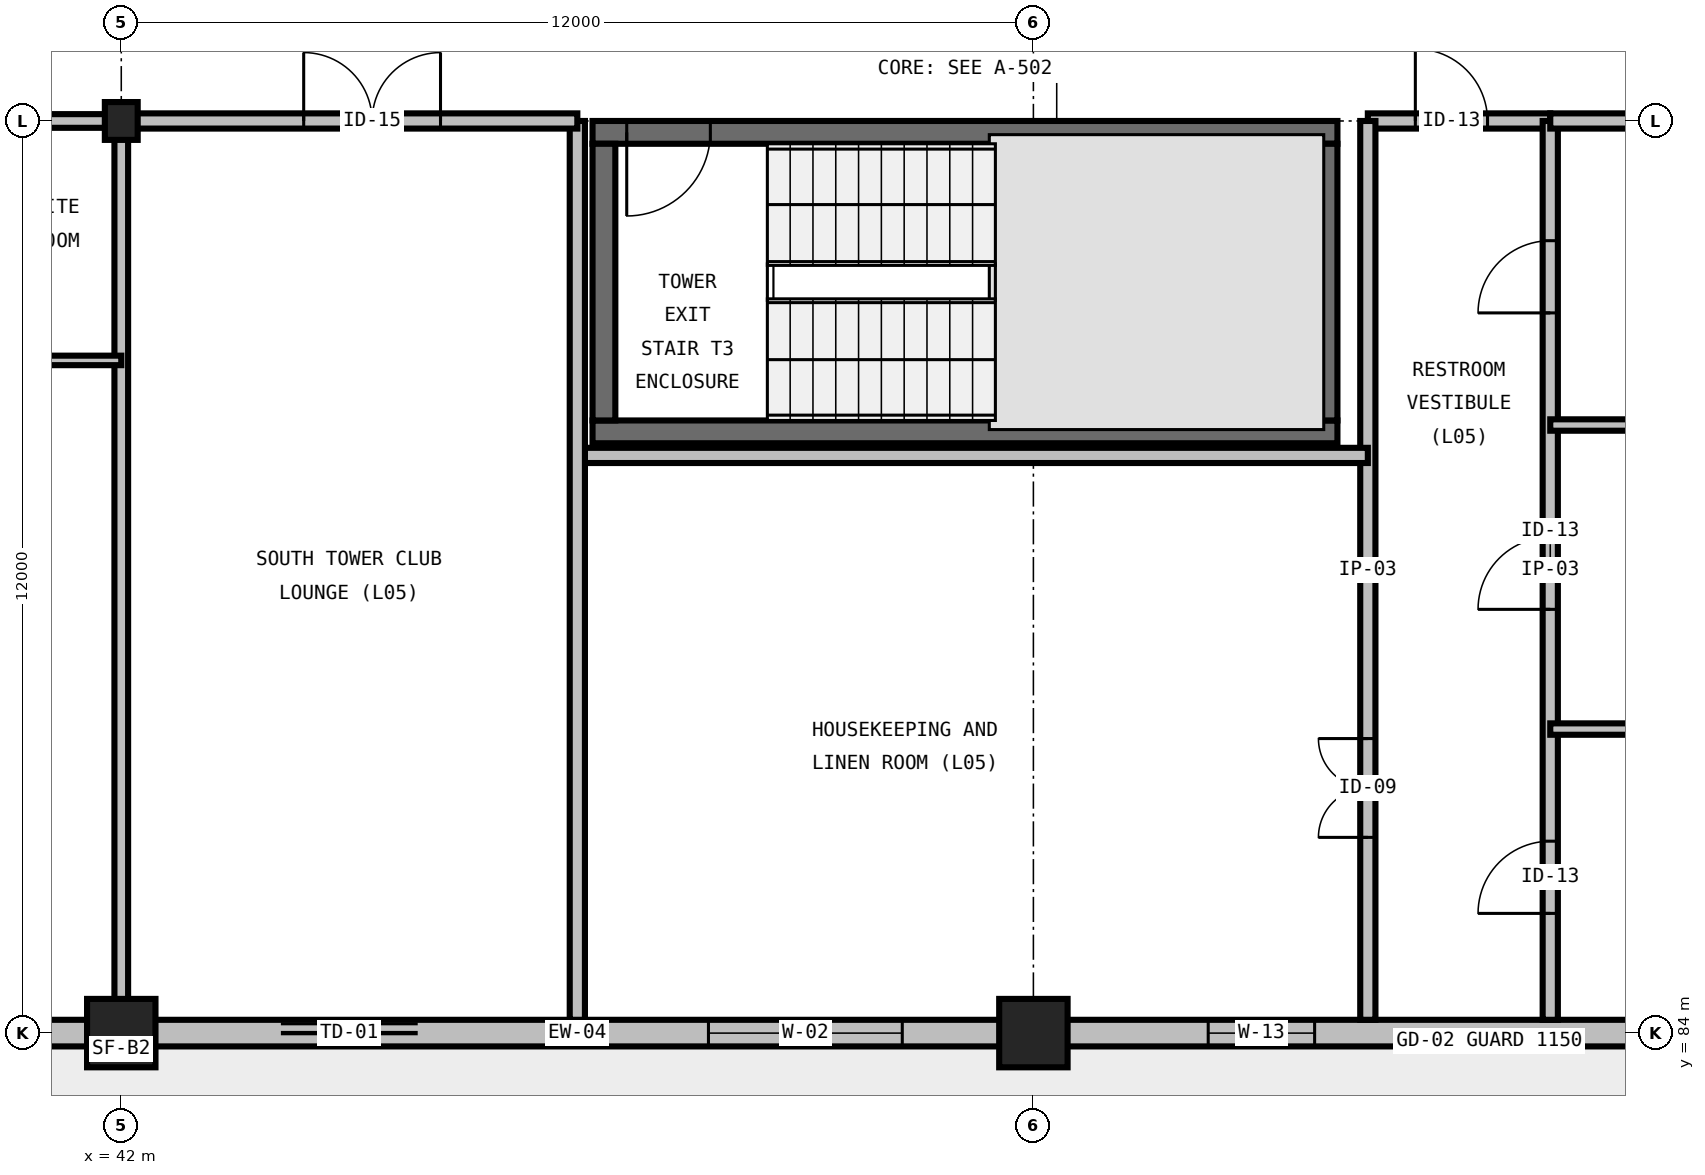
"""IFC4 building model, lengths in metres.
Left out: names, types, materials, properties, quantities, classifications, styles, units other than length and angle.
Written with IfcOpenShell. Run it as: python <this file> out.ifc"""

import sys

from ifc_helpers import new_model, si_unit, direction, frame, frame_2d, origin, origin_2d, place, context, subcontext, project, spatial, rectangle, i_section, extrude, element, fill, save


model = new_model("IFC4")
c1 = context("Model", 3, precision=1e-05, world=origin(), true_north=direction((0.0, 1.0)))
c2 = subcontext(c1, "Body", "Model", "MODEL_VIEW")
j1 = project(units=[si_unit("LENGTHUNIT", "METRE"), si_unit("PLANEANGLEUNIT", "RADIAN")], contexts=[c1])
p1 = place(None, origin())
s1 = spatial("IfcSite", under=j1, at=p1, CompositionType="ELEMENT")
p2 = place(p1, origin())
s2 = spatial("IfcBuilding", under=s1, at=p2, CompositionType="ELEMENT")
p3 = place(p2, frame((0.0, 0.0, 27.6)))
s3 = spatial("IfcBuildingStorey", under=s2, at=p3, CompositionType="ELEMENT", Elevation=27.6)
p4 = place(p3, frame((42.0, 84.0, 0.0), z_axis=(0.0, 0.0, 1.0), x_axis=(1.0, 0.0, 0.0)))
e1 = element("IfcColumn", 1, at=p4, inside=s3, PredefinedType="COLUMN", context=c2, shape_type="SweptSolid", body=[
    extrude(rectangle(XDim=0.9, YDim=0.9, at=origin_2d()), origin(), (0.0, 0.0, 1.0), 3.6),
])
p5 = place(p3, frame((42.0, 96.0, 0.0), z_axis=(0.0, 0.0, 1.0), x_axis=(1.0, 0.0, 0.0)))
e2 = element("IfcColumn", 2, at=p5, inside=s3, PredefinedType="COLUMN", context=c2, shape_type="SweptSolid", body=[
    extrude(i_section(OverallWidth=0.432, OverallDepth=0.498, WebThickness=0.056, FlangeThickness=0.089, FilletRadius=0.031, at=origin_2d()), origin(), (0.0, 0.0, 1.0), 3.6),
])
p6 = place(p3, frame((54.0, 84.0, 0.0), z_axis=(0.0, 0.0, 1.0), x_axis=(1.0, 0.0, 0.0)))
e3 = element("IfcColumn", 3, at=p6, inside=s3, PredefinedType="COLUMN", context=c2, shape_type="SweptSolid", body=[
    extrude(rectangle(XDim=0.9, YDim=0.9, at=origin_2d()), origin(), (0.0, 0.0, 1.0), 3.6),
])
p7 = place(p3, frame((48.2, 91.91, 0.0), z_axis=(0.0, 0.0, 1.0), x_axis=(1.0, 0.0, 0.0)))
e4 = element("IfcWall", 4, at=p7, inside=s3, PredefinedType="SHEAR", context=c2, shape_type="SweptSolid", body=[
    extrude(rectangle(XDim=9.8, YDim=0.3, at=frame_2d((4.9, 0.0))), origin(), (0.0, 0.0, 1.0), 3.6),
])
p8 = place(p3, frame((58.0, 95.85, 0.0), z_axis=(0.0, 0.0, 1.0), x_axis=(-1.0, 0.0, 0.0)))
e5 = element("IfcWall", 5, at=p8, inside=s3, PredefinedType="SHEAR", context=c2, shape_type="SweptSolid", body=[
    extrude(rectangle(XDim=9.8, YDim=0.3, at=frame_2d((4.9, 0.0))), origin(), (0.0, 0.0, 1.0), 3.6),
])
p9 = place(p8, frame((8.25, 0.0, 0.0)))
e6 = element("IfcOpeningElement", 6, at=p9, cuts=e5, PredefinedType="OPENING", context=c2, shape_type="SweptSolid", body=[
    extrude(rectangle(XDim=1.1, YDim=2.2, at=frame_2d((0.55, 1.1))), frame((0.0, 0.165, 0.0), z_axis=(0.0, -1.0, 0.0), x_axis=(1.0, 0.0, 0.0)), (0.0, 0.0, 1.0), 0.33),
])
for number, where, z_axis, x_axis in (
    (7, (48.35, 95.7, 0.0), (0.0, 0.0, 1.0), (0.0, -1.0, 0.0)),
    (8, (57.85, 92.06, 0.0), (0.0, 0.0, 1.0), (0.0, 1.0, 0.0)),
):
    element("IfcWall", number, at=place(p3, frame(where, z_axis=z_axis, x_axis=x_axis)), inside=s3, PredefinedType="SHEAR", context=c2, shape_type="SweptSolid", body=[
        extrude(rectangle(XDim=3.64, YDim=0.3, at=frame_2d((1.82, 0.0))), origin(), (0.0, 0.0, 1.0), 3.6),
    ])
p10 = place(p3, frame((36.0, 84.0, 0.0), z_axis=(0.0, 0.0, 1.0), x_axis=(1.0, 0.0, 0.0)))
e9 = element("IfcWall", 9, at=p10, inside=s3, PredefinedType="STANDARD", context=c2, shape_type="SweptSolid", body=[
    extrude(rectangle(XDim=6.0, YDim=0.35, at=frame_2d((3.0, 0.0))), origin(), (0.0, 0.0, 1.0), 2.486),
])
p11 = place(p10, frame((1.8, 0.0, 0.75)))
e10 = element("IfcOpeningElement", 10, at=p11, cuts=e9, PredefinedType="OPENING", context=c2, shape_type="SweptSolid", body=[
    extrude(rectangle(XDim=2.4, YDim=1.65, at=frame_2d((1.2, 0.825))), frame((0.0, 0.19, 0.0), z_axis=(0.0, -1.0, 0.0), x_axis=(1.0, 0.0, 0.0)), (0.0, 0.0, 1.0), 0.38),
])
p12 = place(p3, frame((42.0, 84.0, 0.0), z_axis=(0.0, 0.0, 1.0), x_axis=(1.0, 0.0, 0.0)))
e11 = element("IfcWall", 11, at=p12, inside=s3, PredefinedType="STANDARD", context=c2, shape_type="SweptSolid", body=[
    extrude(rectangle(XDim=12.0, YDim=0.35, at=frame_2d((6.0, 0.0))), origin(), (0.0, 0.0, 1.0), 2.486),
])
p13 = place(p12, frame((2.1, 0.0, 0.0)))
e12 = element("IfcOpeningElement", 12, at=p13, cuts=e11, PredefinedType="OPENING", context=c2, shape_type="SweptSolid", body=[
    extrude(rectangle(XDim=1.8, YDim=2.2, at=frame_2d((0.9, 1.1))), frame((0.0, 0.19, 0.0), z_axis=(0.0, -1.0, 0.0), x_axis=(1.0, 0.0, 0.0)), (0.0, 0.0, 1.0), 0.38),
])
p14 = place(p12, frame((7.725, 0.0, 0.75)))
e13 = element("IfcOpeningElement", 13, at=p14, cuts=e11, PredefinedType="OPENING", context=c2, shape_type="SweptSolid", body=[
    extrude(rectangle(XDim=2.55, YDim=1.65, at=frame_2d((1.275, 0.825))), frame((0.0, 0.19, 0.0), z_axis=(0.0, -1.0, 0.0), x_axis=(1.0, 0.0, 0.0)), (0.0, 0.0, 1.0), 0.38),
])
p15 = place(p3, frame((54.0, 84.0, 0.0), z_axis=(0.0, 0.0, 1.0), x_axis=(1.0, 0.0, 0.0)))
e14 = element("IfcWall", 14, at=p15, inside=s3, PredefinedType="STANDARD", context=c2, shape_type="SweptSolid", body=[
    extrude(rectangle(XDim=12.0, YDim=0.35, at=frame_2d((6.0, 0.0))), origin(), (0.0, 0.0, 1.0), 2.486),
])
p16 = place(p15, frame((2.3, 0.0, 1.0)))
e15 = element("IfcOpeningElement", 15, at=p16, cuts=e14, PredefinedType="OPENING", context=c2, shape_type="SweptSolid", body=[
    extrude(rectangle(XDim=1.4, YDim=1.4, at=frame_2d((0.7, 0.7))), frame((0.0, 0.19, 0.0), z_axis=(0.0, -1.0, 0.0), x_axis=(1.0, 0.0, 0.0)), (0.0, 0.0, 1.0), 0.38),
])
p17 = place(p15, frame((8.25, 0.0, 1.0)))
e16 = element("IfcOpeningElement", 16, at=p17, cuts=e14, PredefinedType="OPENING", context=c2, shape_type="SweptSolid", body=[
    extrude(rectangle(XDim=1.5, YDim=1.35, at=frame_2d((0.75, 0.675))), frame((0.0, 0.19, 0.0), z_axis=(0.0, -1.0, 0.0), x_axis=(1.0, 0.0, 0.0)), (0.0, 0.0, 1.0), 0.38),
])
p18 = place(p3, frame((58.4, 96.0, 0.0), z_axis=(0.0, 0.0, 1.0), x_axis=(1.0, 0.0, 0.0)))
e17 = element("IfcWall", 17, at=p18, inside=s3, PredefinedType="PARTITIONING", context=c2, shape_type="SweptSolid", body=[
    extrude(rectangle(XDim=2.4, YDim=0.2, at=frame_2d((1.2, 0.0))), origin(), (0.0, 0.0, 1.0), 2.359),
])
p19 = place(p18, frame((0.625, 0.0, 0.0)))
e18 = element("IfcOpeningElement", 18, at=p19, cuts=e17, PredefinedType="OPENING", context=c2, shape_type="SweptSolid", body=[
    extrude(rectangle(XDim=0.95, YDim=2.15, at=frame_2d((0.475, 1.075))), frame((0.0, 0.115, 0.0), z_axis=(0.0, -1.0, 0.0), x_axis=(1.0, 0.0, 0.0)), (0.0, 0.0, 1.0), 0.23),
])
p20 = place(p3, frame((58.4, 84.175, 0.0), z_axis=(0.0, 0.0, 1.0), x_axis=(0.0, 1.0, 0.0)))
e19 = element("IfcWall", 19, at=p20, inside=s3, PredefinedType="PARTITIONING", context=c2, shape_type="SweptSolid", body=[
    extrude(rectangle(XDim=11.825, YDim=0.2, at=frame_2d((5.913, 0.0))), origin(), (0.0, 0.0, 1.0), 3.29),
])
p21 = place(p20, frame((2.4, 0.0, 0.0)))
e20 = element("IfcOpeningElement", 20, at=p21, cuts=e19, PredefinedType="OPENING", context=c2, shape_type="SweptSolid", body=[
    extrude(rectangle(XDim=1.3, YDim=2.2, at=frame_2d((0.65, 1.1))), frame((0.0, 0.115, 0.0), z_axis=(0.0, -1.0, 0.0), x_axis=(1.0, 0.0, 0.0)), (0.0, 0.0, 1.0), 0.23),
])
p22 = place(p3, frame((60.8, 84.175, 0.0), z_axis=(0.0, 0.0, 1.0), x_axis=(0.0, 1.0, 0.0)))
e21 = element("IfcWall", 21, at=p22, inside=s3, PredefinedType="PARTITIONING", context=c2, shape_type="SweptSolid", body=[
    extrude(rectangle(XDim=11.825, YDim=0.2, at=frame_2d((5.913, 0.0))), origin(), (0.0, 0.0, 1.0), 3.29),
])
p23 = place(p22, frame((1.4, 0.0, 0.0)))
e22 = element("IfcOpeningElement", 22, at=p23, cuts=e21, PredefinedType="OPENING", context=c2, shape_type="SweptSolid", body=[
    extrude(rectangle(XDim=0.95, YDim=2.15, at=frame_2d((0.475, 1.075))), frame((0.0, 0.115, 0.0), z_axis=(0.0, -1.0, 0.0), x_axis=(1.0, 0.0, 0.0)), (0.0, 0.0, 1.0), 0.23),
])
p24 = place(p22, frame((5.4, 0.0, 0.0)))
e23 = element("IfcOpeningElement", 23, at=p24, cuts=e21, PredefinedType="OPENING", context=c2, shape_type="SweptSolid", body=[
    extrude(rectangle(XDim=0.95, YDim=2.15, at=frame_2d((0.475, 1.075))), frame((0.0, 0.115, 0.0), z_axis=(0.0, -1.0, 0.0), x_axis=(1.0, 0.0, 0.0)), (0.0, 0.0, 1.0), 0.23),
])
p25 = place(p22, frame((9.3, 0.0, 0.0)))
e24 = element("IfcOpeningElement", 24, at=p25, cuts=e21, PredefinedType="OPENING", context=c2, shape_type="SweptSolid", body=[
    extrude(rectangle(XDim=0.95, YDim=2.15, at=frame_2d((0.475, 1.075))), frame((0.0, 0.115, 0.0), z_axis=(0.0, -1.0, 0.0), x_axis=(1.0, 0.0, 0.0)), (0.0, 0.0, 1.0), 0.23),
])
p26 = place(p3, frame((60.8, 96.0, 0.0), z_axis=(0.0, 0.0, 1.0), x_axis=(1.0, 0.0, 0.0)))
e25 = element("IfcWall", 25, at=p26, inside=s3, PredefinedType="PARTITIONING", context=c2, shape_type="SweptSolid", body=[
    extrude(rectangle(XDim=5.2, YDim=0.2, at=frame_2d((2.6, 0.0))), origin(), (0.0, 0.0, 1.0), 2.359),
])
for number, where, z_axis, x_axis in (
    (26, (60.8, 88.0, 0.0), (0.0, 0.0, 1.0), (1.0, 0.0, 0.0)),
    (27, (60.8, 92.0, 0.0), (0.0, 0.0, 1.0), (1.0, 0.0, 0.0)),
):
    element("IfcWall", number, at=place(p3, frame(where, z_axis=z_axis, x_axis=x_axis)), inside=s3, PredefinedType="PARTITIONING", context=c2, shape_type="SweptSolid", body=[
        extrude(rectangle(XDim=5.2, YDim=0.15, at=frame_2d((2.6, 0.0))), origin(), (0.0, 0.0, 1.0), 3.29),
    ])
p27 = place(p3, frame((48.0, 91.6, 0.0), z_axis=(0.0, 0.0, 1.0), x_axis=(1.0, 0.0, 0.0)))
e28 = element("IfcWall", 28, at=p27, inside=s3, PredefinedType="PARTITIONING", context=c2, shape_type="SweptSolid", body=[
    extrude(rectangle(XDim=10.4, YDim=0.2, at=frame_2d((5.2, 0.0))), origin(), (0.0, 0.0, 1.0), 3.29),
])
p28 = place(p3, frame((48.0, 84.175, 0.0), z_axis=(0.0, 0.0, 1.0), x_axis=(0.0, 1.0, 0.0)))
e29 = element("IfcWall", 29, at=p28, inside=s3, PredefinedType="PARTITIONING", context=c2, shape_type="SweptSolid", body=[
    extrude(rectangle(XDim=11.825, YDim=0.2, at=frame_2d((5.913, 0.0))), origin(), (0.0, 0.0, 1.0), 3.29),
])
p29 = place(p3, frame((42.0, 96.0, 0.0), z_axis=(0.0, 0.0, 1.0), x_axis=(1.0, 0.0, 0.0)))
e30 = element("IfcWall", 30, at=p29, inside=s3, PredefinedType="PARTITIONING", context=c2, shape_type="SweptSolid", body=[
    extrude(rectangle(XDim=6.0, YDim=0.2, at=frame_2d((3.0, 0.0))), origin(), (0.0, 0.0, 1.0), 2.359),
])
p30 = place(p29, frame((2.4, 0.0, 0.0)))
e31 = element("IfcOpeningElement", 31, at=p30, cuts=e30, PredefinedType="OPENING", context=c2, shape_type="SweptSolid", body=[
    extrude(rectangle(XDim=1.8, YDim=2.3, at=frame_2d((0.9, 1.15))), frame((0.0, 0.115, 0.0), z_axis=(0.0, -1.0, 0.0), x_axis=(1.0, 0.0, 0.0)), (0.0, 0.0, 1.0), 0.23),
])
p31 = place(p3, frame((42.0, 84.175, 0.0), z_axis=(0.0, 0.0, 1.0), x_axis=(0.0, 1.0, 0.0)))
e32 = element("IfcWall", 32, at=p31, inside=s3, PredefinedType="PARTITIONING", context=c2, shape_type="SweptSolid", body=[
    extrude(rectangle(XDim=11.825, YDim=0.18, at=frame_2d((5.913, 0.0))), origin(), (0.0, 0.0, 1.0), 2.59),
])
p32 = place(p3, frame((36.0, 96.0, 0.0), z_axis=(0.0, 0.0, 1.0), x_axis=(1.0, 0.0, 0.0)))
e33 = element("IfcWall", 33, at=p32, inside=s3, PredefinedType="PARTITIONING", context=c2, shape_type="SweptSolid", body=[
    extrude(rectangle(XDim=6.0, YDim=0.18, at=frame_2d((3.0, 0.0))), origin(), (0.0, 0.0, 1.0), 2.736),
])
p33 = place(p32, frame((0.77, 0.0, 0.0)))
e34 = element("IfcOpeningElement", 34, at=p33, cuts=e33, PredefinedType="OPENING", context=c2, shape_type="SweptSolid", body=[
    extrude(rectangle(XDim=1.0, YDim=2.15, at=frame_2d((0.5, 1.075))), frame((0.0, 0.105, 0.0), z_axis=(0.0, -1.0, 0.0), x_axis=(1.0, 0.0, 0.0)), (0.0, 0.0, 1.0), 0.21),
])
p34 = place(p3, frame((39.48, 92.85, 0.0), z_axis=(0.0, 0.0, 1.0), x_axis=(1.0, 0.0, 0.0)))
e35 = element("IfcWall", 35, at=p34, inside=s3, PredefinedType="PARTITIONING", context=c2, shape_type="SweptSolid", body=[
    extrude(rectangle(XDim=2.52, YDim=0.125, at=frame_2d((1.26, 0.0))), origin(), (0.0, 0.0, 1.0), 3.29),
])
p35 = place(p9, origin())
e36 = element("IfcDoor", 36, at=p35, inside=s3, OperationType="SINGLE_SWING_RIGHT", PredefinedType="DOOR", context=c2, shape_type="SweptSolid", body=[
    extrude(rectangle(XDim=1.1, YDim=2.2, at=frame_2d((0.55, 1.1))), frame((0.0, 0.025, 0.0), z_axis=(0.0, -1.0, 0.0), x_axis=(1.0, 0.0, 0.0)), (0.0, 0.0, 1.0), 0.05),
])
fill(e6, e36)
p36 = place(p13, origin())
e37 = element("IfcDoor", 37, at=p36, inside=s3, OperationType="DOUBLE_DOOR_SLIDING", PredefinedType="DOOR", context=c2, shape_type="SweptSolid", body=[
    extrude(rectangle(XDim=1.8, YDim=2.2, at=frame_2d((0.9, 1.1))), frame((0.0, 0.025, 0.0), z_axis=(0.0, -1.0, 0.0), x_axis=(1.0, 0.0, 0.0)), (0.0, 0.0, 1.0), 0.05),
])
fill(e12, e37)
p37 = place(p14, origin())
e38 = element("IfcWindow", 38, at=p37, inside=s3, PartitioningType="DOUBLE_PANEL_VERTICAL", PredefinedType="WINDOW", context=c2, shape_type="SweptSolid", body=[
    extrude(rectangle(XDim=2.55, YDim=1.65, at=frame_2d((1.275, 0.825))), frame((0.0, 0.03, 0.0), z_axis=(0.0, -1.0, 0.0), x_axis=(1.0, 0.0, 0.0)), (0.0, 0.0, 1.0), 0.06),
])
fill(e13, e38)
p38 = place(p16, origin())
e39 = element("IfcWindow", 39, at=p38, inside=s3, PartitioningType="SINGLE_PANEL", PredefinedType="WINDOW", context=c2, shape_type="SweptSolid", body=[
    extrude(rectangle(XDim=1.4, YDim=1.4, at=frame_2d((0.7, 0.7))), frame((0.0, 0.03, 0.0), z_axis=(0.0, -1.0, 0.0), x_axis=(1.0, 0.0, 0.0)), (0.0, 0.0, 1.0), 0.06),
])
fill(e15, e39)
p39 = place(p19, origin())
e40 = element("IfcDoor", 40, at=p39, inside=s3, OperationType="SINGLE_SWING_LEFT", PredefinedType="DOOR", context=c2, shape_type="SweptSolid", body=[
    extrude(rectangle(XDim=0.95, YDim=2.15, at=frame_2d((0.475, 1.075))), frame((0.0, 0.025, 0.0), z_axis=(0.0, -1.0, 0.0), x_axis=(1.0, 0.0, 0.0)), (0.0, 0.0, 1.0), 0.05),
])
fill(e18, e40)
p40 = place(p21, origin())
e41 = element("IfcDoor", 41, at=p40, inside=s3, OperationType="DOUBLE_DOOR_SINGLE_SWING", PredefinedType="DOOR", context=c2, shape_type="SweptSolid", body=[
    extrude(rectangle(XDim=1.3, YDim=2.2, at=frame_2d((0.65, 1.1))), frame((0.0, 0.025, 0.0), z_axis=(0.0, -1.0, 0.0), x_axis=(1.0, 0.0, 0.0)), (0.0, 0.0, 1.0), 0.05),
])
fill(e20, e41)
p41 = place(p23, origin())
e42 = element("IfcDoor", 42, at=p41, inside=s3, OperationType="SINGLE_SWING_LEFT", PredefinedType="DOOR", context=c2, shape_type="SweptSolid", body=[
    extrude(rectangle(XDim=0.95, YDim=2.15, at=frame_2d((0.475, 1.075))), frame((0.0, 0.025, 0.0), z_axis=(0.0, -1.0, 0.0), x_axis=(1.0, 0.0, 0.0)), (0.0, 0.0, 1.0), 0.05),
])
fill(e22, e42)
p42 = place(p24, origin())
e43 = element("IfcDoor", 43, at=p42, inside=s3, OperationType="SINGLE_SWING_LEFT", PredefinedType="DOOR", context=c2, shape_type="SweptSolid", body=[
    extrude(rectangle(XDim=0.95, YDim=2.15, at=frame_2d((0.475, 1.075))), frame((0.0, 0.025, 0.0), z_axis=(0.0, -1.0, 0.0), x_axis=(1.0, 0.0, 0.0)), (0.0, 0.0, 1.0), 0.05),
])
fill(e23, e43)
p43 = place(p25, origin())
e44 = element("IfcDoor", 44, at=p43, inside=s3, OperationType="SINGLE_SWING_LEFT", PredefinedType="DOOR", context=c2, shape_type="SweptSolid", body=[
    extrude(rectangle(XDim=0.95, YDim=2.15, at=frame_2d((0.475, 1.075))), frame((0.0, 0.025, 0.0), z_axis=(0.0, -1.0, 0.0), x_axis=(1.0, 0.0, 0.0)), (0.0, 0.0, 1.0), 0.05),
])
fill(e24, e44)
p44 = place(p30, origin())
e45 = element("IfcDoor", 45, at=p44, inside=s3, OperationType="DOUBLE_DOOR_SINGLE_SWING", PredefinedType="DOOR", context=c2, shape_type="SweptSolid", body=[
    extrude(rectangle(XDim=1.8, YDim=2.3, at=frame_2d((0.9, 1.15))), frame((0.0, 0.025, 0.0), z_axis=(0.0, -1.0, 0.0), x_axis=(1.0, 0.0, 0.0)), (0.0, 0.0, 1.0), 0.05),
])
fill(e31, e45)
save(model, sys.argv[1])
